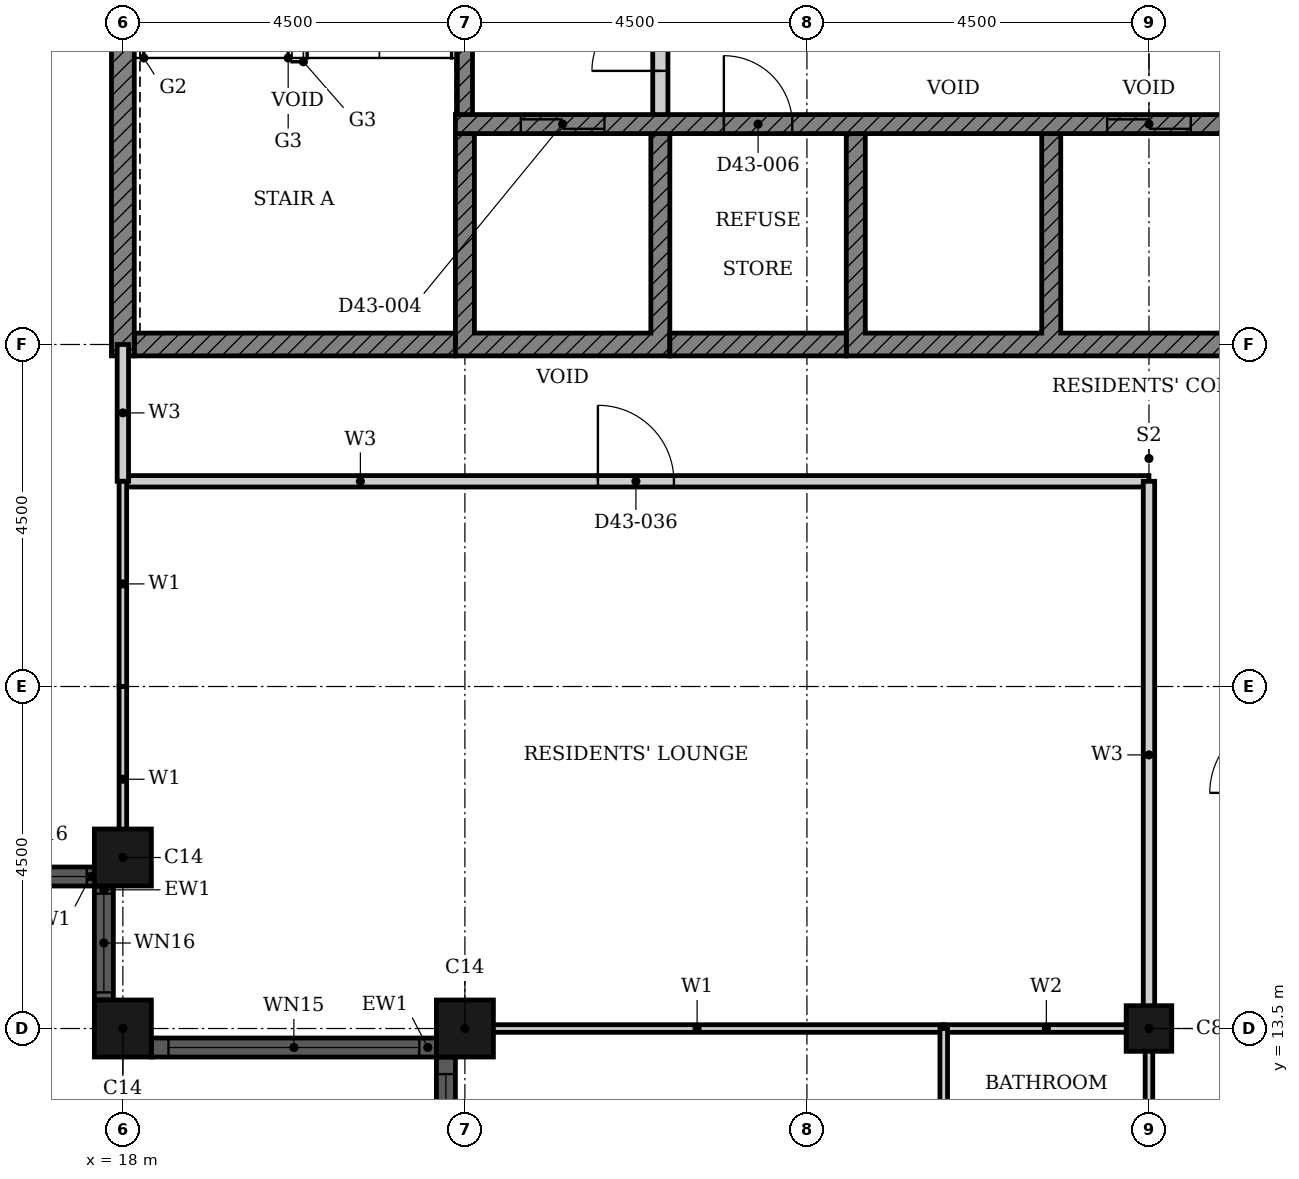
"""IFC4 building model, lengths in metres.
Left out: names, types, materials, properties, quantities, classifications, styles, units other than length and angle.
Written with IfcOpenShell. Run it as: python <this file> out.ifc"""

import sys

from ifc_helpers import new_model, si_unit, direction, frame, frame_2d, origin, origin_2d, place, context, subcontext, project, spatial, polyline, rectangle, hollow_rectangle, outline, extrude, element, fill, save


model = new_model("IFC4")
c1 = context("Model", 3, precision=1e-05, world=origin(), true_north=direction((0.0, 1.0)))
c2 = subcontext(c1, "Body", "Model", "MODEL_VIEW")
j1 = project(units=[si_unit("LENGTHUNIT", "METRE"), si_unit("PLANEANGLEUNIT", "RADIAN")], contexts=[c1])
p1 = place(None, origin())
s1 = spatial("IfcSite", under=j1, at=p1, CompositionType="ELEMENT")
p2 = place(p1, origin())
s2 = spatial("IfcBuilding", under=s1, at=p2, CompositionType="ELEMENT")
p3 = place(p2, frame((0.0, 0.0, 172.8)))
s3 = spatial("IfcBuildingStorey", under=s2, at=p3, CompositionType="ELEMENT", Elevation=172.8)
for number, where, z_axis, x_axis in (
    (1, (18.0, 15.75, 0.0), (0.0, 0.0, 1.0), (1.0, 0.0, 0.0)),
    (2, (18.0, 13.5, 0.0), (0.0, 0.0, 1.0), (1.0, 0.0, 0.0)),
    (3, (22.5, 13.5, 0.0), (0.0, 0.0, 1.0), (1.0, 0.0, 0.0)),
):
    element("IfcColumn", number, at=place(p3, frame(where, z_axis=z_axis, x_axis=x_axis)), inside=s3, PredefinedType="COLUMN", context=c2, shape_type="SweptSolid", body=[
        extrude(hollow_rectangle(XDim=0.75, YDim=0.75, WallThickness=0.024, at=origin_2d()), origin(), (0.0, 0.0, 1.0), 3.7),
    ])
p4 = place(p3, frame((31.5, 13.5, 0.0), z_axis=(0.0, 0.0, 1.0), x_axis=(1.0, 0.0, 0.0)))
e4 = element("IfcColumn", 4, at=p4, inside=s3, PredefinedType="COLUMN", context=c2, shape_type="SweptSolid", body=[
    extrude(hollow_rectangle(XDim=0.6, YDim=0.6, WallThickness=0.02, at=origin_2d()), origin(), (0.0, 0.0, 1.0), 3.7),
])
p5 = place(p3, frame((16.125, 15.5, 0.0), z_axis=(0.0, 0.0, 1.0), x_axis=(1.0, 0.0, 0.0)))
e5 = element("IfcWall", 5, at=p5, inside=s3, PredefinedType="SOLIDWALL", context=c2, shape_type="SweptSolid", body=[
    extrude(rectangle(XDim=1.5, YDim=0.25, at=frame_2d((0.75, 0.0))), origin(), (0.0, 0.0, 1.0), 3.7),
])
p6 = place(p5, frame((0.1, 0.0, 0.9)))
e6 = element("IfcOpeningElement", 6, at=p6, cuts=e5, PredefinedType="OPENING", context=c2, shape_type="SweptSolid", body=[
    extrude(rectangle(XDim=1.3, YDim=1.85, at=frame_2d((0.65, 0.925))), frame((0.0, 0.135, 0.0), z_axis=(0.0, -1.0, 0.0), x_axis=(1.0, 0.0, 0.0)), (0.0, 0.0, 1.0), 0.27),
])
p7 = place(p3, frame((17.75, 15.375, 0.0), z_axis=(0.0, 0.0, 1.0), x_axis=(0.0, -1.0, 0.0)))
e7 = element("IfcWall", 7, at=p7, inside=s3, PredefinedType="SOLIDWALL", context=c2, shape_type="SweptSolid", body=[
    extrude(rectangle(XDim=1.5, YDim=0.25, at=frame_2d((0.75, 0.0))), origin(), (0.0, 0.0, 1.0), 3.7),
])
p8 = place(p7, frame((0.1, 0.0, 0.9)))
e8 = element("IfcOpeningElement", 8, at=p8, cuts=e7, PredefinedType="OPENING", context=c2, shape_type="SweptSolid", body=[
    extrude(rectangle(XDim=1.3, YDim=1.85, at=frame_2d((0.65, 0.925))), frame((0.0, 0.135, 0.0), z_axis=(0.0, -1.0, 0.0), x_axis=(1.0, 0.0, 0.0)), (0.0, 0.0, 1.0), 0.27),
])
p9 = place(p3, frame((18.375, 13.25, 0.0), z_axis=(0.0, 0.0, 1.0), x_axis=(1.0, 0.0, 0.0)))
e9 = element("IfcWall", 9, at=p9, inside=s3, PredefinedType="SOLIDWALL", context=c2, shape_type="SweptSolid", body=[
    extrude(rectangle(XDim=3.75, YDim=0.25, at=frame_2d((1.875, 0.0))), origin(), (0.0, 0.0, 1.0), 3.7),
])
p10 = place(p9, frame((0.225, 0.0, 0.45)))
e10 = element("IfcOpeningElement", 10, at=p10, cuts=e9, PredefinedType="OPENING", context=c2, shape_type="SweptSolid", body=[
    extrude(rectangle(XDim=3.3, YDim=2.3, at=frame_2d((1.65, 1.15))), frame((0.0, 0.135, 0.0), z_axis=(0.0, -1.0, 0.0), x_axis=(1.0, 0.0, 0.0)), (0.0, 0.0, 1.0), 0.27),
])
p11 = place(p3, frame((22.25, 13.125, 0.0), z_axis=(0.0, 0.0, 1.0), x_axis=(0.0, -1.0, 0.0)))
e11 = element("IfcWall", 11, at=p11, inside=s3, PredefinedType="SOLIDWALL", context=c2, shape_type="SweptSolid", body=[
    extrude(rectangle(XDim=8.25, YDim=0.25, at=frame_2d((4.125, 0.0))), origin(), (0.0, 0.0, 1.0), 3.7),
])
p12 = place(p11, frame((0.225, 0.0, 0.45)))
e12 = element("IfcOpeningElement", 12, at=p12, cuts=e11, PredefinedType="OPENING", context=c2, shape_type="SweptSolid", body=[
    extrude(rectangle(XDim=3.3, YDim=2.3, at=frame_2d((1.65, 1.15))), frame((0.0, 0.135, 0.0), z_axis=(0.0, -1.0, 0.0), x_axis=(1.0, 0.0, 0.0)), (0.0, 0.0, 1.0), 0.27),
])
p13 = place(p11, frame((4.725, 0.0, 0.45)))
e13 = element("IfcOpeningElement", 13, at=p13, cuts=e11, PredefinedType="OPENING", context=c2, shape_type="SweptSolid", body=[
    extrude(rectangle(XDim=3.3, YDim=2.3, at=frame_2d((1.65, 1.15))), frame((0.0, 0.135, 0.0), z_axis=(0.0, -1.0, 0.0), x_axis=(1.0, 0.0, 0.0)), (0.0, 0.0, 1.0), 0.27),
])
p14 = place(p3, origin())
e14 = element("IfcWall", 14, at=p14, inside=s3, PredefinedType="SHEAR", context=c2, shape_type="SweptSolid", body=[
    extrude(outline(polyline([(22.375, 22.35), (25.197, 22.35), (25.197, 25.275), (24.947, 25.275), (24.947, 22.65), (22.625, 22.65), (22.625, 25.275), (22.375, 25.275), (22.375, 22.35)])), origin(), (0.0, 0.0, 1.0), 3.4),
])
p15 = place(p3, origin())
e15 = element("IfcWall", 15, at=p15, inside=s3, PredefinedType="SHEAR", context=c2, shape_type="SweptSolid", body=[
    extrude(outline(polyline([(27.518, 22.35), (32.911, 22.35), (32.911, 25.275), (32.661, 25.275), (32.661, 22.65), (30.339, 22.65), (30.339, 25.275), (30.089, 25.275), (30.089, 22.65), (27.768, 22.65), (27.768, 25.275), (27.518, 25.275), (27.518, 22.35)])), origin(), (0.0, 0.0, 1.0), 3.4),
])
p16 = place(p3, frame((18.15, 22.5, 0.0), z_axis=(0.0, 0.0, 1.0), x_axis=(1.0, 0.0, 0.0)))
e16 = element("IfcWall", 16, at=p16, inside=s3, PredefinedType="SHEAR", context=c2, shape_type="SweptSolid", body=[
    extrude(rectangle(XDim=4.225, YDim=0.3, at=frame_2d((2.113, 0.0))), origin(), (0.0, 0.0, 1.0), 3.4),
])
p17 = place(p3, frame((25.197, 22.5, 0.0), z_axis=(0.0, 0.0, 1.0), x_axis=(1.0, 0.0, 0.0)))
e17 = element("IfcWall", 17, at=p17, inside=s3, PredefinedType="SHEAR", context=c2, shape_type="SweptSolid", body=[
    extrude(rectangle(XDim=2.321, YDim=0.3, at=frame_2d((1.161, 0.0))), origin(), (0.0, 0.0, 1.0), 3.4),
])
p18 = place(p3, frame((18.0, 22.35, 0.0), z_axis=(0.0, 0.0, 1.0), x_axis=(0.0, 1.0, 0.0)))
e18 = element("IfcWall", 18, at=p18, inside=s3, PredefinedType="SHEAR", context=c2, shape_type="SweptSolid", body=[
    extrude(rectangle(XDim=9.3, YDim=0.3, at=frame_2d((4.65, 0.0))), origin(), (0.0, 0.0, 1.0), 3.4),
])
p19 = place(p3, frame((22.375, 25.4, 0.0), z_axis=(0.0, 0.0, 1.0), x_axis=(1.0, 0.0, 0.0)))
e19 = element("IfcWall", 19, at=p19, inside=s3, PredefinedType="SHEAR", context=c2, shape_type="SweptSolid", body=[
    extrude(rectangle(XDim=15.678, YDim=0.25, at=frame_2d((7.839, 0.0))), origin(), (0.0, 0.0, 1.0), 3.4),
])
p20 = place(p19, frame((8.575, 0.0, 0.0)))
e20 = element("IfcOpeningElement", 20, at=p20, cuts=e19, PredefinedType="OPENING", context=c2, shape_type="SweptSolid", body=[
    extrude(rectangle(XDim=1.1, YDim=2.1, at=frame_2d((0.55, 1.05))), frame((0.0, 0.135, 0.0), z_axis=(0.0, -1.0, 0.0), x_axis=(1.0, 0.0, 0.0)), (0.0, 0.0, 1.0), 0.27),
])
p21 = place(p19, frame((0.861, 0.0, 0.0)))
e21 = element("IfcOpeningElement", 21, at=p21, cuts=e19, PredefinedType="OPENING", context=c2, shape_type="SweptSolid", body=[
    extrude(rectangle(XDim=1.1, YDim=2.1, at=frame_2d((0.55, 1.05))), frame((0.0, 0.135, 0.0), z_axis=(0.0, -1.0, 0.0), x_axis=(1.0, 0.0, 0.0)), (0.0, 0.0, 1.0), 0.27),
])
p22 = place(p19, frame((3.532, 0.0, 0.0)))
e22 = element("IfcOpeningElement", 22, at=p22, cuts=e19, PredefinedType="OPENING", context=c2, shape_type="SweptSolid", body=[
    extrude(rectangle(XDim=0.9, YDim=2.1, at=frame_2d((0.45, 1.05))), frame((0.0, 0.135, 0.0), z_axis=(0.0, -1.0, 0.0), x_axis=(1.0, 0.0, 0.0)), (0.0, 0.0, 1.0), 0.27),
])
p23 = place(p19, frame((11.246, 0.0, 0.0)))
e23 = element("IfcOpeningElement", 23, at=p23, cuts=e19, PredefinedType="OPENING", context=c2, shape_type="SweptSolid", body=[
    extrude(rectangle(XDim=0.9, YDim=2.1, at=frame_2d((0.45, 1.05))), frame((0.0, 0.135, 0.0), z_axis=(0.0, -1.0, 0.0), x_axis=(1.0, 0.0, 0.0)), (0.0, 0.0, 1.0), 0.27),
])
p24 = place(p19, frame((13.818, 0.0, 0.0)))
e24 = element("IfcOpeningElement", 24, at=p24, cuts=e19, PredefinedType="OPENING", context=c2, shape_type="SweptSolid", body=[
    extrude(rectangle(XDim=0.9, YDim=2.1, at=frame_2d((0.45, 1.05))), frame((0.0, 0.135, 0.0), z_axis=(0.0, -1.0, 0.0), x_axis=(1.0, 0.0, 0.0)), (0.0, 0.0, 1.0), 0.27),
])
p25 = place(p3, frame((22.5, 31.35, 0.0), z_axis=(0.0, 0.0, 1.0), x_axis=(0.0, -1.0, 0.0)))
e25 = element("IfcWall", 25, at=p25, inside=s3, PredefinedType="SHEAR", context=c2, shape_type="SweptSolid", body=[
    extrude(rectangle(XDim=5.825, YDim=0.2, at=frame_2d((2.913, 0.0))), origin(), (0.0, 0.0, 1.0), 3.4),
])
p26 = place(p25, frame((0.25, 0.0, 0.0)))
e26 = element("IfcOpeningElement", 26, at=p26, cuts=e25, PredefinedType="OPENING", context=c2, shape_type="SweptSolid", body=[
    extrude(rectangle(XDim=1.8, YDim=2.1, at=frame_2d((0.9, 1.05))), frame((0.0, 0.11, 0.0), z_axis=(0.0, -1.0, 0.0), x_axis=(1.0, 0.0, 0.0)), (0.0, 0.0, 1.0), 0.22),
])
p27 = place(p3, frame((25.072, 25.525, 0.0), z_axis=(0.0, 0.0, 1.0), x_axis=(0.0, 1.0, 0.0)))
e27 = element("IfcWall", 27, at=p27, inside=s3, PredefinedType="PARTITIONING", context=c2, shape_type="SweptSolid", body=[
    extrude(rectangle(XDim=2.95, YDim=0.2, at=frame_2d((1.475, 0.0))), origin(), (0.0, 0.0, 1.0), 3.4),
])
p28 = place(p27, frame((0.575, 0.0, 0.0)))
e28 = element("IfcOpeningElement", 28, at=p28, cuts=e27, PredefinedType="OPENING", context=c2, shape_type="SweptSolid", body=[
    extrude(rectangle(XDim=1.8, YDim=2.1, at=frame_2d((0.9, 1.05))), frame((0.0, 0.11, 0.0), z_axis=(0.0, -1.0, 0.0), x_axis=(1.0, 0.0, 0.0)), (0.0, 0.0, 1.0), 0.22),
])
p29 = place(p3, frame((18.0, 20.7, 0.0), z_axis=(0.0, 0.0, 1.0), x_axis=(1.0, 0.0, 0.0)))
e29 = element("IfcWall", 29, at=p29, inside=s3, PredefinedType="PARTITIONING", context=c2, shape_type="SweptSolid", body=[
    extrude(rectangle(XDim=13.5, YDim=0.15, at=frame_2d((6.75, 0.0))), origin(), (0.0, 0.0, 1.0), 3.4),
])
p30 = place(p29, frame((6.25, 0.0, 0.0)))
e30 = element("IfcOpeningElement", 30, at=p30, cuts=e29, PredefinedType="OPENING", context=c2, shape_type="SweptSolid", body=[
    extrude(rectangle(XDim=1.0, YDim=2.1, at=frame_2d((0.5, 1.05))), frame((0.0, 0.085, 0.0), z_axis=(0.0, -1.0, 0.0), x_axis=(1.0, 0.0, 0.0)), (0.0, 0.0, 1.0), 0.17),
])
p31 = place(p3, frame((18.0, 20.7, 0.0), z_axis=(0.0, 0.0, 1.0), x_axis=(0.0, 1.0, 0.0)))
e31 = element("IfcWall", 31, at=p31, inside=s3, PredefinedType="PARTITIONING", context=c2, shape_type="SweptSolid", body=[
    extrude(rectangle(XDim=1.8, YDim=0.15, at=frame_2d((0.9, 0.0))), origin(), (0.0, 0.0, 1.0), 3.4),
])
p32 = place(p3, frame((31.5, 13.5, 0.0), z_axis=(0.0, 0.0, 1.0), x_axis=(0.0, 1.0, 0.0)))
e32 = element("IfcWall", 32, at=p32, inside=s3, PredefinedType="PARTITIONING", context=c2, shape_type="SweptSolid", body=[
    extrude(rectangle(XDim=7.2, YDim=0.15, at=frame_2d((3.6, 0.0))), origin(), (0.0, 0.0, 1.0), 3.4),
])
p33 = place(p3, frame((22.31, 13.5, 0.0), z_axis=(0.0, 0.0, 1.0), x_axis=(1.0, 0.0, 0.0)))
e33 = element("IfcWall", 33, at=p33, inside=s3, PredefinedType="PARTITIONING", context=c2, shape_type="SweptSolid", body=[
    extrude(rectangle(XDim=6.49, YDim=0.1, at=frame_2d((3.245, 0.0))), origin(), (0.0, 0.0, 1.0), 2.48),
])
p34 = place(p3, frame((18.0, 15.56, 0.0), z_axis=(0.0, 0.0, 1.0), x_axis=(0.0, 1.0, 0.0)))
e34 = element("IfcWall", 34, at=p34, inside=s3, PredefinedType="PARTITIONING", context=c2, shape_type="SweptSolid", body=[
    extrude(rectangle(XDim=2.439, YDim=0.1, at=frame_2d((1.219, 0.0))), origin(), (0.0, 0.0, 1.0), 3.4),
])
p35 = place(p3, frame((18.0, 18.0, 0.0), z_axis=(0.0, 0.0, 1.0), x_axis=(0.0, 1.0, 0.0)))
e35 = element("IfcWall", 35, at=p35, inside=s3, PredefinedType="PARTITIONING", context=c2, shape_type="SweptSolid", body=[
    extrude(rectangle(XDim=2.7, YDim=0.1, at=frame_2d((1.35, 0.0))), origin(), (0.0, 0.0, 1.0), 3.4),
])
p36 = place(p3, frame((28.8, 13.5, 0.0), z_axis=(0.0, 0.0, 1.0), x_axis=(1.0, 0.0, 0.0)))
e36 = element("IfcWall", 36, at=p36, inside=s3, PredefinedType="PARTITIONING", context=c2, shape_type="SweptSolid", body=[
    extrude(rectangle(XDim=2.7, YDim=0.1, at=frame_2d((1.35, 0.0))), origin(), (0.0, 0.0, 1.0), 2.48),
])
p37 = place(p3, frame((28.8, 11.1, 0.0), z_axis=(0.0, 0.0, 1.0), x_axis=(0.0, 1.0, 0.0)))
e37 = element("IfcWall", 37, at=p37, inside=s3, PredefinedType="PARTITIONING", context=c2, shape_type="SweptSolid", body=[
    extrude(rectangle(XDim=2.4, YDim=0.1, at=frame_2d((1.2, 0.0))), origin(), (0.0, 0.0, 1.0), 3.4),
])
p38 = place(p3, frame((31.5, 11.1, 0.0), z_axis=(0.0, 0.0, 1.0), x_axis=(0.0, 1.0, 0.0)))
e38 = element("IfcWall", 38, at=p38, inside=s3, PredefinedType="PARTITIONING", context=c2, shape_type="SweptSolid", body=[
    extrude(rectangle(XDim=2.4, YDim=0.1, at=frame_2d((1.2, 0.0))), origin(), (0.0, 0.0, 1.0), 2.68),
])
p39 = place(p6, origin())
e39 = element("IfcWindow", 39, at=p39, inside=s3, PartitioningType="SINGLE_PANEL", PredefinedType="WINDOW", context=c2, shape_type="SweptSolid", body=[
    extrude(rectangle(XDim=1.3, YDim=1.85, at=frame_2d((0.65, 0.925))), frame((0.0, 0.03, 0.0), z_axis=(0.0, -1.0, 0.0), x_axis=(1.0, 0.0, 0.0)), (0.0, 0.0, 1.0), 0.06),
])
fill(e6, e39)
p40 = place(p8, origin())
e40 = element("IfcWindow", 40, at=p40, inside=s3, PartitioningType="SINGLE_PANEL", PredefinedType="WINDOW", context=c2, shape_type="SweptSolid", body=[
    extrude(rectangle(XDim=1.3, YDim=1.85, at=frame_2d((0.65, 0.925))), frame((0.0, 0.03, 0.0), z_axis=(0.0, -1.0, 0.0), x_axis=(1.0, 0.0, 0.0)), (0.0, 0.0, 1.0), 0.06),
])
fill(e8, e40)
p41 = place(p10, origin())
e41 = element("IfcWindow", 41, at=p41, inside=s3, PartitioningType="SINGLE_PANEL", PredefinedType="WINDOW", context=c2, shape_type="SweptSolid", body=[
    extrude(rectangle(XDim=3.3, YDim=2.3, at=frame_2d((1.65, 1.15))), frame((0.0, 0.03, 0.0), z_axis=(0.0, -1.0, 0.0), x_axis=(1.0, 0.0, 0.0)), (0.0, 0.0, 1.0), 0.06),
])
fill(e10, e41)
p42 = place(p12, origin())
e42 = element("IfcWindow", 42, at=p42, inside=s3, PartitioningType="SINGLE_PANEL", PredefinedType="WINDOW", context=c2, shape_type="SweptSolid", body=[
    extrude(rectangle(XDim=3.3, YDim=2.3, at=frame_2d((1.65, 1.15))), frame((0.0, 0.03, 0.0), z_axis=(0.0, -1.0, 0.0), x_axis=(1.0, 0.0, 0.0)), (0.0, 0.0, 1.0), 0.06),
])
fill(e12, e42)
p43 = place(p20, origin())
e43 = element("IfcDoor", 43, at=p43, inside=s3, OperationType="DOUBLE_DOOR_SLIDING", PredefinedType="DOOR", context=c2, shape_type="SweptSolid", body=[
    extrude(rectangle(XDim=1.1, YDim=2.1, at=frame_2d((0.55, 1.05))), frame((0.0, 0.025, 0.0), z_axis=(0.0, -1.0, 0.0), x_axis=(1.0, 0.0, 0.0)), (0.0, 0.0, 1.0), 0.05),
])
fill(e20, e43)
p44 = place(p21, origin())
e44 = element("IfcDoor", 44, at=p44, inside=s3, OperationType="DOUBLE_DOOR_SLIDING", PredefinedType="DOOR", context=c2, shape_type="SweptSolid", body=[
    extrude(rectangle(XDim=1.1, YDim=2.1, at=frame_2d((0.55, 1.05))), frame((0.0, 0.025, 0.0), z_axis=(0.0, -1.0, 0.0), x_axis=(1.0, 0.0, 0.0)), (0.0, 0.0, 1.0), 0.05),
])
fill(e21, e44)
p45 = place(p22, origin())
e45 = element("IfcDoor", 45, at=p45, inside=s3, OperationType="SINGLE_SWING_LEFT", PredefinedType="DOOR", context=c2, shape_type="SweptSolid", body=[
    extrude(rectangle(XDim=0.9, YDim=2.1, at=frame_2d((0.45, 1.05))), frame((0.0, 0.025, 0.0), z_axis=(0.0, -1.0, 0.0), x_axis=(1.0, 0.0, 0.0)), (0.0, 0.0, 1.0), 0.05),
])
fill(e22, e45)
p46 = place(p28, origin())
e46 = element("IfcDoor", 46, at=p46, inside=s3, OperationType="DOUBLE_DOOR_SINGLE_SWING", PredefinedType="DOOR", context=c2, shape_type="SweptSolid", body=[
    extrude(rectangle(XDim=1.8, YDim=2.1, at=frame_2d((0.9, 1.05))), frame((0.0, 0.025, 0.0), z_axis=(0.0, -1.0, 0.0), x_axis=(1.0, 0.0, 0.0)), (0.0, 0.0, 1.0), 0.05),
])
fill(e28, e46)
p47 = place(p30, origin())
e47 = element("IfcDoor", 47, at=p47, inside=s3, OperationType="SINGLE_SWING_RIGHT", PredefinedType="DOOR", context=c2, shape_type="SweptSolid", body=[
    extrude(rectangle(XDim=1.0, YDim=2.1, at=frame_2d((0.5, 1.05))), frame((0.0, 0.025, 0.0), z_axis=(0.0, -1.0, 0.0), x_axis=(1.0, 0.0, 0.0)), (0.0, 0.0, 1.0), 0.05),
])
fill(e30, e47)
save(model, sys.argv[1])
